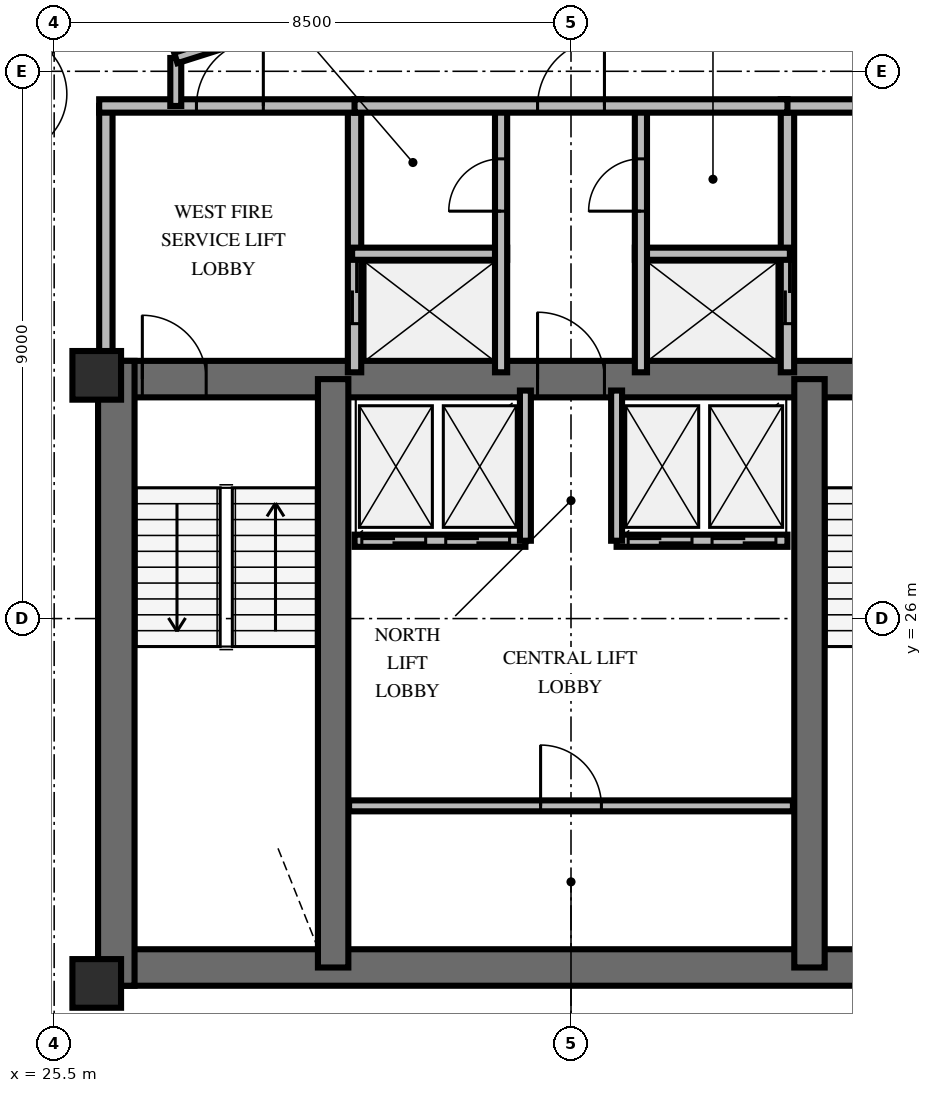
"""IFC4 building model, lengths in metres.
Left out: names, types, materials, properties, quantities, classifications, styles, units other than length and angle.
Written with IfcOpenShell. Run it as: python <this file> out.ifc"""

import sys

from ifc_helpers import new_model, si_unit, direction, frame, frame_2d, origin, origin_2d, place, context, subcontext, project, spatial, rectangle, extrude, element, fill, save


model = new_model("IFC4")
c1 = context("Model", 3, precision=1e-05, world=origin(), true_north=direction((0.0, 1.0)))
c2 = subcontext(c1, "Body", "Model", "MODEL_VIEW")
j1 = project(units=[si_unit("LENGTHUNIT", "METRE"), si_unit("PLANEANGLEUNIT", "RADIAN")], contexts=[c1])
p1 = place(None, origin())
s1 = spatial("IfcSite", under=j1, at=p1, CompositionType="ELEMENT")
p2 = place(p1, origin())
s2 = spatial("IfcBuilding", under=s1, at=p2, CompositionType="ELEMENT")
p3 = place(p2, frame((0.0, 0.0, 234.0)))
s3 = spatial("IfcBuildingStorey", under=s2, at=p3, CompositionType="ELEMENT", Elevation=234.0)
p4 = place(p3, frame((26.222, 20.262, 0.0), z_axis=(0.0, 0.0, 1.0), x_axis=(1.0, 0.0, 0.0)))
e1 = element("IfcWall", 1, at=p4, inside=s3, PredefinedType="SHEAR", context=c2, shape_type="SweptSolid", body=[
    extrude(rectangle(XDim=15.566, YDim=0.6, at=frame_2d((7.783, 0.0))), origin(), (0.0, 0.0, 1.0), 3.6),
])
p5 = place(p3, frame((26.222, 29.938, 0.0), z_axis=(0.0, 0.0, 1.0), x_axis=(1.0, 0.0, 0.0)))
e2 = element("IfcWall", 2, at=p5, inside=s3, PredefinedType="SHEAR", context=c2, shape_type="SweptSolid", body=[
    extrude(rectangle(XDim=15.566, YDim=0.6, at=frame_2d((7.783, 0.0))), origin(), (0.0, 0.0, 1.0), 3.6),
])
p6 = place(p5, frame((0.728, 0.0, 0.0)))
e3 = element("IfcOpeningElement", 3, at=p6, cuts=e2, PredefinedType="OPENING", context=c2, shape_type="SweptSolid", body=[
    extrude(rectangle(XDim=1.05, YDim=2.15, at=frame_2d((0.525, 1.075))), frame((0.0, 0.31, 0.0), z_axis=(0.0, -1.0, 0.0), x_axis=(1.0, 0.0, 0.0)), (0.0, 0.0, 1.0), 0.62),
])
p7 = place(p5, frame((13.778, 0.0, 0.0)))
e4 = element("IfcOpeningElement", 4, at=p7, cuts=e2, PredefinedType="OPENING", context=c2, shape_type="SweptSolid", body=[
    extrude(rectangle(XDim=1.05, YDim=2.15, at=frame_2d((0.525, 1.075))), frame((0.0, 0.31, 0.0), z_axis=(0.0, -1.0, 0.0), x_axis=(1.0, 0.0, 0.0)), (0.0, 0.0, 1.0), 0.62),
])
p8 = place(p5, frame((7.228, 0.0, 0.0)))
e5 = element("IfcOpeningElement", 5, at=p8, cuts=e2, PredefinedType="OPENING", context=c2, shape_type="SweptSolid", body=[
    extrude(rectangle(XDim=1.1, YDim=2.15, at=frame_2d((0.55, 1.075))), frame((0.0, 0.31, 0.0), z_axis=(0.0, -1.0, 0.0), x_axis=(1.0, 0.0, 0.0)), (0.0, 0.0, 1.0), 0.62),
])
p9 = place(p3, frame((26.522, 19.962, 0.0), z_axis=(0.0, 0.0, 1.0), x_axis=(0.0, 1.0, 0.0)))
e6 = element("IfcWall", 6, at=p9, inside=s3, PredefinedType="SHEAR", context=c2, shape_type="SweptSolid", body=[
    extrude(rectangle(XDim=10.276, YDim=0.6, at=frame_2d((5.138, 0.0))), origin(), (0.0, 0.0, 1.0), 3.6),
])
for number, where, z_axis, x_axis in (
    (7, (30.088, 20.262, 0.0), (0.0, 0.0, 1.0), (0.0, 1.0, 0.0)),
    (8, (37.922, 20.262, 0.0), (0.0, 0.0, 1.0), (0.0, 1.0, 0.0)),
):
    element("IfcWall", number, at=place(p3, frame(where, z_axis=z_axis, x_axis=x_axis)), inside=s3, PredefinedType="SHEAR", context=c2, shape_type="SweptSolid", body=[
        extrude(rectangle(XDim=9.676, YDim=0.5, at=frame_2d((4.838, 0.0))), origin(), (0.0, 0.0, 1.0), 3.6),
    ])
for number, where, z_axis, x_axis in (
    (9, (26.2, 20.0, 0.0), (0.0, 0.0, 1.0), (1.0, 0.0, 0.0)),
    (10, (26.2, 30.0, 0.0), (0.0, 0.0, 1.0), (1.0, 0.0, 0.0)),
):
    element("IfcColumn", number, at=place(p3, frame(where, z_axis=z_axis, x_axis=x_axis)), inside=s3, PredefinedType="PILASTER", context=c2, shape_type="SweptSolid", body=[
        extrude(rectangle(XDim=0.8, YDim=0.8, at=origin_2d()), origin(), (0.0, 0.0, 1.0), 3.6),
    ])
p10 = place(p3, frame((26.35, 30.05, 0.0), z_axis=(0.0, 0.0, 1.0), x_axis=(0.0, 1.0, 0.0)))
e11 = element("IfcWall", 11, at=p10, inside=s3, PredefinedType="SOLIDWALL", context=c2, shape_type="SweptSolid", body=[
    extrude(rectangle(XDim=4.38, YDim=0.22, at=frame_2d((2.19, 0.0))), origin(), (0.0, 0.0, 1.0), 2.46),
])
p11 = place(p3, frame((30.44, 30.05, 0.0), z_axis=(0.0, 0.0, 1.0), x_axis=(0.0, 1.0, 0.0)))
e12 = element("IfcWall", 12, at=p11, inside=s3, PredefinedType="SOLIDWALL", context=c2, shape_type="SweptSolid", body=[
    extrude(rectangle(XDim=4.38, YDim=0.22, at=frame_2d((2.19, 0.0))), origin(), (0.0, 0.0, 1.0), 2.46),
])
p12 = place(p11, frame((0.8, 0.0, 0.0)))
e13 = element("IfcOpeningElement", 13, at=p12, cuts=e12, PredefinedType="OPENING", context=c2, shape_type="SweptSolid", body=[
    extrude(rectangle(XDim=1.05, YDim=2.1, at=frame_2d((0.525, 1.05))), frame((0.0, 0.12, 0.0), z_axis=(0.0, -1.0, 0.0), x_axis=(1.0, 0.0, 0.0)), (0.0, 0.0, 1.0), 0.24),
])
p13 = place(p3, frame((26.24, 34.43, 0.0), z_axis=(0.0, 0.0, 1.0), x_axis=(1.0, 0.0, 0.0)))
e14 = element("IfcWall", 14, at=p13, inside=s3, PredefinedType="SOLIDWALL", context=c2, shape_type="SweptSolid", body=[
    extrude(rectangle(XDim=4.31, YDim=0.22, at=frame_2d((2.155, 0.0))), origin(), (0.0, 0.0, 1.0), 2.46),
])
p14 = place(p13, frame((1.6, 0.0, 0.0)))
e15 = element("IfcOpeningElement", 15, at=p14, cuts=e14, PredefinedType="OPENING", context=c2, shape_type="SweptSolid", body=[
    extrude(rectangle(XDim=1.1, YDim=2.15, at=frame_2d((0.55, 1.075))), frame((0.0, 0.12, 0.0), z_axis=(0.0, -1.0, 0.0), x_axis=(1.0, 0.0, 0.0)), (0.0, 0.0, 1.0), 0.24),
])
p15 = place(p3, frame((30.4, 32.0, 0.0), z_axis=(0.0, 0.0, 1.0), x_axis=(1.0, 0.0, 0.0)))
e16 = element("IfcWall", 16, at=p15, inside=s3, PredefinedType="SOLIDWALL", context=c2, shape_type="SweptSolid", body=[
    extrude(rectangle(XDim=2.55, YDim=0.2, at=frame_2d((1.275, 0.0))), origin(), (0.0, 0.0, 1.0), 2.46),
])
p16 = place(p3, frame((32.85, 30.05, 0.0), z_axis=(0.0, 0.0, 1.0), x_axis=(0.0, 1.0, 0.0)))
e17 = element("IfcWall", 17, at=p16, inside=s3, PredefinedType="SOLIDWALL", context=c2, shape_type="SweptSolid", body=[
    extrude(rectangle(XDim=4.38, YDim=0.2, at=frame_2d((2.19, 0.0))), origin(), (0.0, 0.0, 1.0), 2.46),
])
p17 = place(p16, frame((2.65, 0.0, 0.0)))
e18 = element("IfcOpeningElement", 18, at=p17, cuts=e17, PredefinedType="OPENING", context=c2, shape_type="SweptSolid", body=[
    extrude(rectangle(XDim=0.86, YDim=2.05, at=frame_2d((0.43, 1.025))), frame((0.0, 0.11, 0.0), z_axis=(0.0, -1.0, 0.0), x_axis=(1.0, 0.0, 0.0)), (0.0, 0.0, 1.0), 0.22),
])
p18 = place(p3, frame((37.56, 30.05, 0.0), z_axis=(0.0, 0.0, 1.0), x_axis=(0.0, 1.0, 0.0)))
e19 = element("IfcWall", 19, at=p18, inside=s3, PredefinedType="SOLIDWALL", context=c2, shape_type="SweptSolid", body=[
    extrude(rectangle(XDim=4.38, YDim=0.22, at=frame_2d((2.19, 0.0))), origin(), (0.0, 0.0, 1.0), 2.46),
])
p19 = place(p18, frame((0.8, 0.0, 0.0)))
e20 = element("IfcOpeningElement", 20, at=p19, cuts=e19, PredefinedType="OPENING", context=c2, shape_type="SweptSolid", body=[
    extrude(rectangle(XDim=1.05, YDim=2.1, at=frame_2d((0.525, 1.05))), frame((0.0, 0.12, 0.0), z_axis=(0.0, -1.0, 0.0), x_axis=(1.0, 0.0, 0.0)), (0.0, 0.0, 1.0), 0.24),
])
p20 = place(p3, frame((37.45, 34.43, 0.0), z_axis=(0.0, 0.0, 1.0), x_axis=(1.0, 0.0, 0.0)))
e21 = element("IfcWall", 21, at=p20, inside=s3, PredefinedType="SOLIDWALL", context=c2, shape_type="SweptSolid", body=[
    extrude(rectangle(XDim=4.31, YDim=0.22, at=frame_2d((2.155, 0.0))), origin(), (0.0, 0.0, 1.0), 2.46),
])
p21 = place(p20, frame((1.6, 0.0, 0.0)))
e22 = element("IfcOpeningElement", 22, at=p21, cuts=e21, PredefinedType="OPENING", context=c2, shape_type="SweptSolid", body=[
    extrude(rectangle(XDim=1.1, YDim=2.15, at=frame_2d((0.55, 1.075))), frame((0.0, 0.12, 0.0), z_axis=(0.0, -1.0, 0.0), x_axis=(1.0, 0.0, 0.0)), (0.0, 0.0, 1.0), 0.24),
])
p22 = place(p3, frame((35.05, 32.0, 0.0), z_axis=(0.0, 0.0, 1.0), x_axis=(1.0, 0.0, 0.0)))
e23 = element("IfcWall", 23, at=p22, inside=s3, PredefinedType="SOLIDWALL", context=c2, shape_type="SweptSolid", body=[
    extrude(rectangle(XDim=2.55, YDim=0.2, at=frame_2d((1.275, 0.0))), origin(), (0.0, 0.0, 1.0), 2.46),
])
p23 = place(p3, frame((35.15, 30.05, 0.0), z_axis=(0.0, 0.0, 1.0), x_axis=(0.0, 1.0, 0.0)))
e24 = element("IfcWall", 24, at=p23, inside=s3, PredefinedType="SOLIDWALL", context=c2, shape_type="SweptSolid", body=[
    extrude(rectangle(XDim=4.38, YDim=0.2, at=frame_2d((2.19, 0.0))), origin(), (0.0, 0.0, 1.0), 2.46),
])
p24 = place(p23, frame((2.65, 0.0, 0.0)))
e25 = element("IfcOpeningElement", 25, at=p24, cuts=e24, PredefinedType="OPENING", context=c2, shape_type="SweptSolid", body=[
    extrude(rectangle(XDim=0.86, YDim=2.05, at=frame_2d((0.43, 1.025))), frame((0.0, 0.11, 0.0), z_axis=(0.0, -1.0, 0.0), x_axis=(1.0, 0.0, 0.0)), (0.0, 0.0, 1.0), 0.22),
])
p25 = place(p3, frame((30.44, 34.43, 0.0), z_axis=(0.0, 0.0, 1.0), x_axis=(1.0, 0.0, 0.0)))
e26 = element("IfcWall", 26, at=p25, inside=s3, PredefinedType="SOLIDWALL", context=c2, shape_type="SweptSolid", body=[
    extrude(rectangle(XDim=7.12, YDim=0.22, at=frame_2d((3.56, 0.0))), origin(), (0.0, 0.0, 1.0), 2.46),
])
p26 = place(p25, frame((3.01, 0.0, 0.0)))
e27 = element("IfcOpeningElement", 27, at=p26, cuts=e26, PredefinedType="OPENING", context=c2, shape_type="SweptSolid", body=[
    extrude(rectangle(XDim=1.1, YDim=2.15, at=frame_2d((0.55, 1.075))), frame((0.0, 0.12, 0.0), z_axis=(0.0, -1.0, 0.0), x_axis=(1.0, 0.0, 0.0)), (0.0, 0.0, 1.0), 0.24),
])
p27 = place(p3, frame((30.35, 22.92, 0.0), z_axis=(0.0, 0.0, 1.0), x_axis=(1.0, 0.0, 0.0)))
e28 = element("IfcWall", 28, at=p27, inside=s3, PredefinedType="PARTITIONING", context=c2, shape_type="SweptSolid", body=[
    extrude(rectangle(XDim=7.3, YDim=0.18, at=frame_2d((3.65, 0.0))), origin(), (0.0, 0.0, 1.0), 2.46),
])
p28 = place(p27, frame((3.15, 0.0, 0.0)))
e29 = element("IfcOpeningElement", 29, at=p28, cuts=e28, PredefinedType="OPENING", context=c2, shape_type="SweptSolid", body=[
    extrude(rectangle(XDim=1.0, YDim=2.15, at=frame_2d((0.5, 1.075))), frame((0.0, 0.1, 0.0), z_axis=(0.0, -1.0, 0.0), x_axis=(1.0, 0.0, 0.0)), (0.0, 0.0, 1.0), 0.2),
])
p29 = place(p3, frame((30.44, 27.28, 0.0), z_axis=(0.0, 0.0, 1.0), x_axis=(1.0, 0.0, 0.0)))
e30 = element("IfcWall", 30, at=p29, inside=s3, PredefinedType="SOLIDWALL", context=c2, shape_type="SweptSolid", body=[
    extrude(rectangle(XDim=2.81, YDim=0.2, at=frame_2d((1.405, 0.0))), origin(), (0.0, 0.0, 1.0), 2.46),
])
p30 = place(p29, frame((0.12, 0.0, 0.0)))
e31 = element("IfcOpeningElement", 31, at=p30, cuts=e30, PredefinedType="OPENING", context=c2, shape_type="SweptSolid", body=[
    extrude(rectangle(XDim=1.05, YDim=2.1, at=frame_2d((0.525, 1.05))), frame((0.0, 0.11, 0.0), z_axis=(0.0, -1.0, 0.0), x_axis=(1.0, 0.0, 0.0)), (0.0, 0.0, 1.0), 0.22),
])
p31 = place(p29, frame((1.5, 0.0, 0.0)))
e32 = element("IfcOpeningElement", 32, at=p31, cuts=e30, PredefinedType="OPENING", context=c2, shape_type="SweptSolid", body=[
    extrude(rectangle(XDim=1.05, YDim=2.1, at=frame_2d((0.525, 1.05))), frame((0.0, 0.11, 0.0), z_axis=(0.0, -1.0, 0.0), x_axis=(1.0, 0.0, 0.0)), (0.0, 0.0, 1.0), 0.22),
])
p32 = place(p3, frame((33.25, 27.28, 0.0), z_axis=(0.0, 0.0, 1.0), x_axis=(0.0, 1.0, 0.0)))
e33 = element("IfcWall", 33, at=p32, inside=s3, PredefinedType="SOLIDWALL", context=c2, shape_type="SweptSolid", body=[
    extrude(rectangle(XDim=2.47, YDim=0.18, at=frame_2d((1.235, 0.0))), origin(), (0.0, 0.0, 1.0), 2.46),
])
p33 = place(p3, frame((34.75, 27.28, 0.0), z_axis=(0.0, 0.0, 1.0), x_axis=(1.0, 0.0, 0.0)))
e34 = element("IfcWall", 34, at=p33, inside=s3, PredefinedType="SOLIDWALL", context=c2, shape_type="SweptSolid", body=[
    extrude(rectangle(XDim=2.81, YDim=0.2, at=frame_2d((1.405, 0.0))), origin(), (0.0, 0.0, 1.0), 2.46),
])
p34 = place(p33, frame((0.19, 0.0, 0.0)))
e35 = element("IfcOpeningElement", 35, at=p34, cuts=e34, PredefinedType="OPENING", context=c2, shape_type="SweptSolid", body=[
    extrude(rectangle(XDim=1.05, YDim=2.1, at=frame_2d((0.525, 1.05))), frame((0.0, 0.11, 0.0), z_axis=(0.0, -1.0, 0.0), x_axis=(1.0, 0.0, 0.0)), (0.0, 0.0, 1.0), 0.22),
])
p35 = place(p33, frame((1.57, 0.0, 0.0)))
e36 = element("IfcOpeningElement", 36, at=p35, cuts=e34, PredefinedType="OPENING", context=c2, shape_type="SweptSolid", body=[
    extrude(rectangle(XDim=1.05, YDim=2.1, at=frame_2d((0.525, 1.05))), frame((0.0, 0.11, 0.0), z_axis=(0.0, -1.0, 0.0), x_axis=(1.0, 0.0, 0.0)), (0.0, 0.0, 1.0), 0.22),
])
p36 = place(p3, frame((34.75, 27.28, 0.0), z_axis=(0.0, 0.0, 1.0), x_axis=(0.0, 1.0, 0.0)))
e37 = element("IfcWall", 37, at=p36, inside=s3, PredefinedType="SOLIDWALL", context=c2, shape_type="SweptSolid", body=[
    extrude(rectangle(XDim=2.47, YDim=0.18, at=frame_2d((1.235, 0.0))), origin(), (0.0, 0.0, 1.0), 2.46),
])
p37 = place(p3, frame((27.5, 34.43, 0.0), z_axis=(0.0, 0.0, 1.0), x_axis=(0.0, 1.0, 0.0)))
e38 = element("IfcWall", 38, at=p37, inside=s3, PredefinedType="PARTITIONING", context=c2, shape_type="SweptSolid", body=[
    extrude(rectangle(XDim=0.789, YDim=0.18, at=frame_2d((0.395, 0.0))), origin(), (0.0, 0.0, 1.0), 2.46),
])
p38 = place(p3, frame((27.5, 35.219, 0.0), z_axis=(0.0, 0.0, 1.0), x_axis=(0.953228121756, 0.302251795518, 0.0)))
e39 = element("IfcWall", 39, at=p38, inside=s3, PredefinedType="PARTITIONING", context=c2, shape_type="SweptSolid", body=[
    extrude(rectangle(XDim=6.819, YDim=0.18, at=frame_2d((3.409, 0.0))), origin(), (0.0, 0.0, 1.0), 2.46),
])
p39 = place(p38, frame((2.86, 0.0, 0.0)))
e40 = element("IfcOpeningElement", 40, at=p39, cuts=e39, PredefinedType="OPENING", context=c2, shape_type="SweptSolid", body=[
    extrude(rectangle(XDim=1.1, YDim=2.15, at=frame_2d((0.55, 1.075))), frame((0.0, 0.1, 0.0), z_axis=(0.0, -1.0, 0.0), x_axis=(1.0, 0.0, 0.0)), (0.0, 0.0, 1.0), 0.2),
])
p40 = place(p3, frame((34.0, 37.28, 0.0), z_axis=(0.0, 0.0, 1.0), x_axis=(0.953228121756, -0.302251795518, 0.0)))
e41 = element("IfcWall", 41, at=p40, inside=s3, PredefinedType="PARTITIONING", context=c2, shape_type="SweptSolid", body=[
    extrude(rectangle(XDim=6.819, YDim=0.18, at=frame_2d((3.409, 0.0))), origin(), (0.0, 0.0, 1.0), 2.46),
])
p41 = place(p40, frame((2.86, 0.0, 0.0)))
e42 = element("IfcOpeningElement", 42, at=p41, cuts=e41, PredefinedType="OPENING", context=c2, shape_type="SweptSolid", body=[
    extrude(rectangle(XDim=1.1, YDim=2.15, at=frame_2d((0.55, 1.075))), frame((0.0, 0.1, 0.0), z_axis=(0.0, -1.0, 0.0), x_axis=(1.0, 0.0, 0.0)), (0.0, 0.0, 1.0), 0.2),
])
p42 = place(p3, frame((25.997, 36.079, 0.0), z_axis=(0.0, 0.0, 1.0), x_axis=(-0.663274838451, -0.748375900652, 0.0)))
e43 = element("IfcWall", 43, at=p42, inside=s3, PredefinedType="PARTITIONING", context=c2, shape_type="SweptSolid", body=[
    extrude(rectangle(XDim=4.47, YDim=0.18, at=frame_2d((2.235, 0.0))), origin(), (0.0, 0.0, 1.0), 2.46),
])
p43 = place(p42, frame((0.942, 0.0, 0.0)))
e44 = element("IfcOpeningElement", 44, at=p43, cuts=e43, PredefinedType="OPENING", context=c2, shape_type="SweptSolid", body=[
    extrude(rectangle(XDim=1.0, YDim=2.15, at=frame_2d((0.5, 1.075))), frame((0.0, 0.1, 0.0), z_axis=(0.0, -1.0, 0.0), x_axis=(1.0, 0.0, 0.0)), (0.0, 0.0, 1.0), 0.2),
])
p44 = place(p3, frame((22.684, 19.869, 0.0), z_axis=(0.0, 0.0, 1.0), x_axis=(0.621813175889, -0.783165611024, 0.0)))
e45 = element("IfcWall", 45, at=p44, inside=s3, PredefinedType="PARTITIONING", context=c2, shape_type="SweptSolid", body=[
    extrude(rectangle(XDim=4.47, YDim=0.18, at=frame_2d((2.235, 0.0))), origin(), (0.0, 0.0, 1.0), 2.46),
])
p45 = place(p6, origin())
e46 = element("IfcDoor", 46, at=p45, inside=s3, OperationType="SINGLE_SWING_LEFT", PredefinedType="DOOR", context=c2, shape_type="SweptSolid", body=[
    extrude(rectangle(XDim=1.05, YDim=2.15, at=frame_2d((0.525, 1.075))), frame((0.0, 0.025, 0.0), z_axis=(0.0, -1.0, 0.0), x_axis=(1.0, 0.0, 0.0)), (0.0, 0.0, 1.0), 0.05),
])
fill(e3, e46)
p46 = place(p8, origin())
e47 = element("IfcDoor", 47, at=p46, inside=s3, OperationType="SINGLE_SWING_LEFT", PredefinedType="DOOR", context=c2, shape_type="SweptSolid", body=[
    extrude(rectangle(XDim=1.1, YDim=2.15, at=frame_2d((0.55, 1.075))), frame((0.0, 0.025, 0.0), z_axis=(0.0, -1.0, 0.0), x_axis=(1.0, 0.0, 0.0)), (0.0, 0.0, 1.0), 0.05),
])
fill(e5, e47)
p47 = place(p14, origin())
e48 = element("IfcDoor", 48, at=p47, inside=s3, OperationType="SINGLE_SWING_RIGHT", PredefinedType="DOOR", context=c2, shape_type="SweptSolid", body=[
    extrude(rectangle(XDim=1.1, YDim=2.15, at=frame_2d((0.55, 1.075))), frame((0.0, 0.025, 0.0), z_axis=(0.0, -1.0, 0.0), x_axis=(1.0, 0.0, 0.0)), (0.0, 0.0, 1.0), 0.05),
])
fill(e15, e48)
p48 = place(p12, origin())
e49 = element("IfcDoor", 49, at=p48, inside=s3, OperationType="DOUBLE_DOOR_SLIDING", PredefinedType="USERDEFINED", context=c2, shape_type="SweptSolid", body=[
    extrude(rectangle(XDim=1.05, YDim=2.1, at=frame_2d((0.525, 1.05))), frame((0.0, 0.025, 0.0), z_axis=(0.0, -1.0, 0.0), x_axis=(1.0, 0.0, 0.0)), (0.0, 0.0, 1.0), 0.05),
])
fill(e13, e49)
p49 = place(p17, origin())
e50 = element("IfcDoor", 50, at=p49, inside=s3, OperationType="SINGLE_SWING_LEFT", PredefinedType="TRAPDOOR", context=c2, shape_type="SweptSolid", body=[
    extrude(rectangle(XDim=0.86, YDim=2.05, at=frame_2d((0.43, 1.025))), frame((0.0, 0.025, 0.0), z_axis=(0.0, -1.0, 0.0), x_axis=(1.0, 0.0, 0.0)), (0.0, 0.0, 1.0), 0.05),
])
fill(e18, e50)
p50 = place(p19, origin())
e51 = element("IfcDoor", 51, at=p50, inside=s3, OperationType="DOUBLE_DOOR_SLIDING", PredefinedType="USERDEFINED", context=c2, shape_type="SweptSolid", body=[
    extrude(rectangle(XDim=1.05, YDim=2.1, at=frame_2d((0.525, 1.05))), frame((0.0, 0.025, 0.0), z_axis=(0.0, -1.0, 0.0), x_axis=(1.0, 0.0, 0.0)), (0.0, 0.0, 1.0), 0.05),
])
fill(e20, e51)
p51 = place(p24, origin())
e52 = element("IfcDoor", 52, at=p51, inside=s3, OperationType="SINGLE_SWING_LEFT", PredefinedType="TRAPDOOR", context=c2, shape_type="SweptSolid", body=[
    extrude(rectangle(XDim=0.86, YDim=2.05, at=frame_2d((0.43, 1.025))), frame((0.0, 0.025, 0.0), z_axis=(0.0, -1.0, 0.0), x_axis=(1.0, 0.0, 0.0)), (0.0, 0.0, 1.0), 0.05),
])
fill(e25, e52)
p52 = place(p26, origin())
e53 = element("IfcDoor", 53, at=p52, inside=s3, OperationType="SINGLE_SWING_RIGHT", PredefinedType="DOOR", context=c2, shape_type="SweptSolid", body=[
    extrude(rectangle(XDim=1.1, YDim=2.15, at=frame_2d((0.55, 1.075))), frame((0.0, 0.025, 0.0), z_axis=(0.0, -1.0, 0.0), x_axis=(1.0, 0.0, 0.0)), (0.0, 0.0, 1.0), 0.05),
])
fill(e27, e53)
p53 = place(p28, origin())
e54 = element("IfcDoor", 54, at=p53, inside=s3, OperationType="SINGLE_SWING_LEFT", PredefinedType="DOOR", context=c2, shape_type="SweptSolid", body=[
    extrude(rectangle(XDim=1.0, YDim=2.15, at=frame_2d((0.5, 1.075))), frame((0.0, 0.025, 0.0), z_axis=(0.0, -1.0, 0.0), x_axis=(1.0, 0.0, 0.0)), (0.0, 0.0, 1.0), 0.05),
])
fill(e29, e54)
p54 = place(p30, origin())
e55 = element("IfcDoor", 55, at=p54, inside=s3, OperationType="DOUBLE_DOOR_SLIDING", PredefinedType="USERDEFINED", context=c2, shape_type="SweptSolid", body=[
    extrude(rectangle(XDim=1.05, YDim=2.1, at=frame_2d((0.525, 1.05))), frame((0.0, 0.025, 0.0), z_axis=(0.0, -1.0, 0.0), x_axis=(1.0, 0.0, 0.0)), (0.0, 0.0, 1.0), 0.05),
])
fill(e31, e55)
p55 = place(p31, origin())
e56 = element("IfcDoor", 56, at=p55, inside=s3, OperationType="DOUBLE_DOOR_SLIDING", PredefinedType="USERDEFINED", context=c2, shape_type="SweptSolid", body=[
    extrude(rectangle(XDim=1.05, YDim=2.1, at=frame_2d((0.525, 1.05))), frame((0.0, 0.025, 0.0), z_axis=(0.0, -1.0, 0.0), x_axis=(1.0, 0.0, 0.0)), (0.0, 0.0, 1.0), 0.05),
])
fill(e32, e56)
p56 = place(p34, origin())
e57 = element("IfcDoor", 57, at=p56, inside=s3, OperationType="DOUBLE_DOOR_SLIDING", PredefinedType="USERDEFINED", context=c2, shape_type="SweptSolid", body=[
    extrude(rectangle(XDim=1.05, YDim=2.1, at=frame_2d((0.525, 1.05))), frame((0.0, 0.025, 0.0), z_axis=(0.0, -1.0, 0.0), x_axis=(1.0, 0.0, 0.0)), (0.0, 0.0, 1.0), 0.05),
])
fill(e35, e57)
p57 = place(p35, origin())
e58 = element("IfcDoor", 58, at=p57, inside=s3, OperationType="DOUBLE_DOOR_SLIDING", PredefinedType="USERDEFINED", context=c2, shape_type="SweptSolid", body=[
    extrude(rectangle(XDim=1.05, YDim=2.1, at=frame_2d((0.525, 1.05))), frame((0.0, 0.025, 0.0), z_axis=(0.0, -1.0, 0.0), x_axis=(1.0, 0.0, 0.0)), (0.0, 0.0, 1.0), 0.05),
])
fill(e36, e58)
save(model, sys.argv[1])
